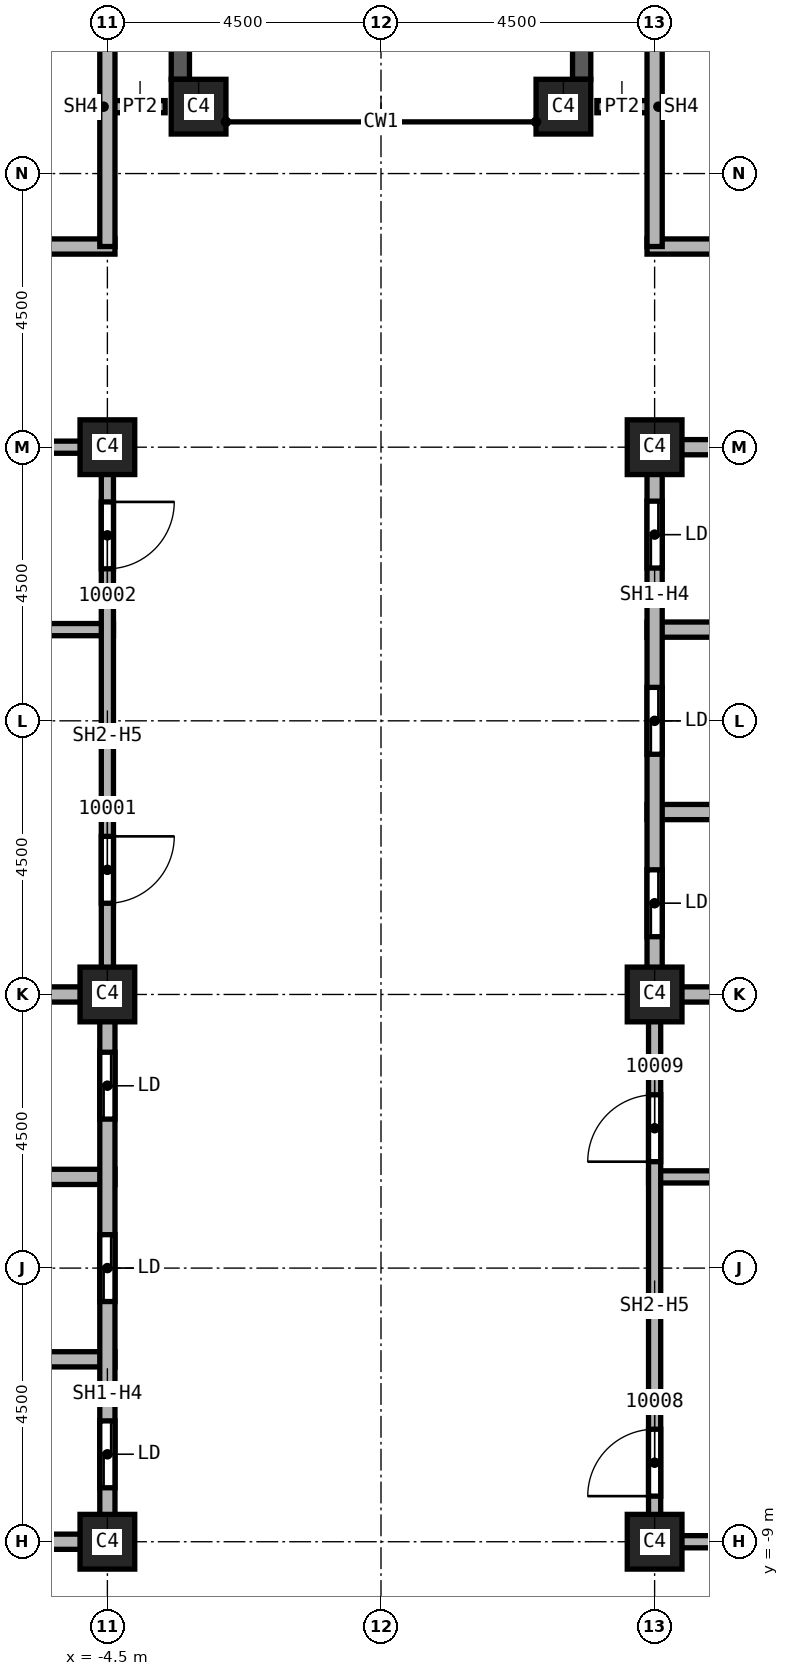
"""IFC4 building model, lengths in metres.
Left out: names, types, materials, properties, quantities, classifications, styles, units other than length and angle.
Written with IfcOpenShell. Run it as: python <this file> out.ifc"""

import sys

from ifc_helpers import new_model, si_unit, direction, frame, frame_2d, origin, origin_2d, place, context, subcontext, project, spatial, rectangle, extrude, element, fill, save


model = new_model("IFC4")
c1 = context("Model", 3, precision=1e-05, world=origin(), true_north=direction((0.0, 1.0)))
c2 = subcontext(c1, "Body", "Model", "MODEL_VIEW")
j1 = project(units=[si_unit("LENGTHUNIT", "METRE"), si_unit("PLANEANGLEUNIT", "RADIAN")], contexts=[c1])
p1 = place(None, origin())
s1 = spatial("IfcSite", under=j1, at=p1, CompositionType="ELEMENT")
p2 = place(p1, origin())
s2 = spatial("IfcBuilding", under=s1, at=p2, CompositionType="ELEMENT")
p3 = place(p2, frame((0.0, 0.0, 170.0)))
s3 = spatial("IfcBuildingStorey", under=s2, at=p3, CompositionType="ELEMENT", Elevation=170.0)
for number, where, z_axis, x_axis in (
    (1, (4.5, 0.0, 0.0), (0.0, 0.0, 1.0), (1.0, 0.0, 0.0)),
    (2, (4.5, 9.0, 0.0), (0.0, 0.0, 1.0), (1.0, 0.0, 0.0)),
    (3, (4.5, -9.0, 0.0), (0.0, 0.0, 1.0), (1.0, 0.0, 0.0)),
    (4, (-4.5, 0.0, 0.0), (0.0, 0.0, 1.0), (1.0, 0.0, 0.0)),
    (5, (-4.5, 9.0, 0.0), (0.0, 0.0, 1.0), (1.0, 0.0, 0.0)),
    (6, (-4.5, -9.0, 0.0), (0.0, 0.0, 1.0), (1.0, 0.0, 0.0)),
    (7, (3.0, 14.6, 0.0), (0.0, 0.0, 1.0), (1.0, 0.0, 0.0)),
    (8, (-3.0, 14.6, 0.0), (0.0, 0.0, 1.0), (1.0, 0.0, 0.0)),
):
    element("IfcColumn", number, at=place(p3, frame(where, z_axis=z_axis, x_axis=x_axis)), inside=s3, PredefinedType="COLUMN", context=c2, shape_type="SweptSolid", body=[
        extrude(rectangle(XDim=0.9, YDim=0.9, at=origin_2d()), origin(), (0.0, 0.0, 1.0), 3.7),
    ])
p4 = place(p3, frame((3.3, 23.05, 0.0), z_axis=(0.0, 0.0, 1.0), x_axis=(0.0, -1.0, 0.0)))
e9 = element("IfcWall", 9, at=p4, inside=s3, PredefinedType="SOLIDWALL", context=c2, shape_type="SweptSolid", body=[
    extrude(rectangle(XDim=8.0, YDim=0.3, at=frame_2d((4.0, 0.0))), origin(), (0.0, 0.0, 1.0), 3.1),
])
p5 = place(p4, frame((0.8, 0.0, 0.8)))
e10 = element("IfcOpeningElement", 10, at=p5, cuts=e9, PredefinedType="OPENING", context=c2, shape_type="SweptSolid", body=[
    extrude(rectangle(XDim=2.4, YDim=1.95, at=frame_2d((1.2, 0.975))), frame((0.0, 0.15, 0.0), z_axis=(0.0, -1.0, 0.0), x_axis=(1.0, 0.0, 0.0)), (0.0, 0.0, 1.0), 0.3),
])
p6 = place(p4, frame((4.8, 0.0, 0.8)))
e11 = element("IfcOpeningElement", 11, at=p6, cuts=e9, PredefinedType="OPENING", context=c2, shape_type="SweptSolid", body=[
    extrude(rectangle(XDim=2.4, YDim=1.95, at=frame_2d((1.2, 0.975))), frame((0.0, 0.15, 0.0), z_axis=(0.0, -1.0, 0.0), x_axis=(1.0, 0.0, 0.0)), (0.0, 0.0, 1.0), 0.3),
])
p7 = place(p3, frame((-3.3, 15.05, 0.0), z_axis=(0.0, 0.0, 1.0), x_axis=(0.0, 1.0, 0.0)))
e12 = element("IfcWall", 12, at=p7, inside=s3, PredefinedType="SOLIDWALL", context=c2, shape_type="SweptSolid", body=[
    extrude(rectangle(XDim=8.0, YDim=0.3, at=frame_2d((4.0, 0.0))), origin(), (0.0, 0.0, 1.0), 3.1),
])
p8 = place(p7, frame((0.8, 0.0, 0.8)))
e13 = element("IfcOpeningElement", 13, at=p8, cuts=e12, PredefinedType="OPENING", context=c2, shape_type="SweptSolid", body=[
    extrude(rectangle(XDim=2.4, YDim=1.95, at=frame_2d((1.2, 0.975))), frame((0.0, 0.15, 0.0), z_axis=(0.0, -1.0, 0.0), x_axis=(1.0, 0.0, 0.0)), (0.0, 0.0, 1.0), 0.3),
])
p9 = place(p7, frame((4.8, 0.0, 0.8)))
e14 = element("IfcOpeningElement", 14, at=p9, cuts=e12, PredefinedType="OPENING", context=c2, shape_type="SweptSolid", body=[
    extrude(rectangle(XDim=2.4, YDim=1.95, at=frame_2d((1.2, 0.975))), frame((0.0, 0.15, 0.0), z_axis=(0.0, -1.0, 0.0), x_axis=(1.0, 0.0, 0.0)), (0.0, 0.0, 1.0), 0.3),
])
for number, where, z_axis, x_axis in (
    (15, (-4.5, 14.6, 0.0), (0.0, 0.0, 1.0), (1.0, 0.0, 0.0)),
    (16, (3.55, 14.6, 0.0), (0.0, 0.0, 1.0), (1.0, 0.0, 0.0)),
):
    element("IfcWall", number, at=place(p3, frame(where, z_axis=z_axis, x_axis=x_axis)), inside=s3, PredefinedType="PARTITIONING", context=c2, shape_type="SweptSolid", body=[
        extrude(rectangle(XDim=0.95, YDim=0.2, at=frame_2d((0.475, 0.0))), origin(), (0.0, 0.0, 1.0), 3.7),
    ])
p10 = place(p3, frame((-7.6, 6.0, 0.0), z_axis=(0.0, 0.0, 1.0), x_axis=(1.0, 0.0, 0.0)))
e17 = element("IfcWall", 17, at=p10, inside=s3, PredefinedType="SOLIDWALL", context=c2, shape_type="SweptSolid", body=[
    extrude(rectangle(XDim=3.2, YDim=0.2, at=frame_2d((1.6, 0.0))), origin(), (0.0, 0.0, 1.0), 3.7),
])
p11 = place(p3, frame((-7.5, 9.0, 0.0), z_axis=(0.0, 0.0, 1.0), x_axis=(1.0, 0.0, 0.0)))
e18 = element("IfcWall", 18, at=p11, inside=s3, PredefinedType="SOLIDWALL", context=c2, shape_type="SweptSolid", body=[
    extrude(rectangle(XDim=3.0, YDim=0.2, at=frame_2d((1.5, 0.0))), origin(), (0.0, 0.0, 1.0), 2.938),
])
p12 = place(p3, frame((-4.5, 9.1, 0.0), z_axis=(0.0, 0.0, 1.0), x_axis=(0.0, -1.0, 0.0)))
e19 = element("IfcWall", 19, at=p12, inside=s3, PredefinedType="SOLIDWALL", context=c2, shape_type="SweptSolid", body=[
    extrude(rectangle(XDim=9.1, YDim=0.2, at=frame_2d((4.55, 0.0))), origin(), (0.0, 0.0, 1.0), 2.938),
])
p13 = place(p12, frame((6.5, 0.0, 0.0)))
e20 = element("IfcOpeningElement", 20, at=p13, cuts=e19, PredefinedType="OPENING", context=c2, shape_type="SweptSolid", body=[
    extrude(rectangle(XDim=1.1, YDim=2.1, at=frame_2d((0.55, 1.05))), frame((0.0, 0.1, 0.0), z_axis=(0.0, -1.0, 0.0), x_axis=(1.0, 0.0, 0.0)), (0.0, 0.0, 1.0), 0.2),
])
p14 = place(p12, frame((1.0, 0.0, 0.0)))
e21 = element("IfcOpeningElement", 21, at=p14, cuts=e19, PredefinedType="OPENING", context=c2, shape_type="SweptSolid", body=[
    extrude(rectangle(XDim=1.1, YDim=2.1, at=frame_2d((0.55, 1.05))), frame((0.0, 0.1, 0.0), z_axis=(0.0, -1.0, 0.0), x_axis=(1.0, 0.0, 0.0)), (0.0, 0.0, 1.0), 0.2),
])
p15 = place(p3, frame((4.4, -3.0, 0.0), z_axis=(0.0, 0.0, 1.0), x_axis=(1.0, 0.0, 0.0)))
e22 = element("IfcWall", 22, at=p15, inside=s3, PredefinedType="SOLIDWALL", context=c2, shape_type="SweptSolid", body=[
    extrude(rectangle(XDim=3.225, YDim=0.2, at=frame_2d((1.613, 0.0))), origin(), (0.0, 0.0, 1.0), 3.7),
])
p16 = place(p3, frame((4.5, -9.1, 0.0), z_axis=(0.0, 0.0, 1.0), x_axis=(0.0, 1.0, 0.0)))
e23 = element("IfcWall", 23, at=p16, inside=s3, PredefinedType="SOLIDWALL", context=c2, shape_type="SweptSolid", body=[
    extrude(rectangle(XDim=9.1, YDim=0.2, at=frame_2d((4.55, 0.0))), origin(), (0.0, 0.0, 1.0), 2.938),
])
p17 = place(p16, frame((0.85, 0.0, 0.0)))
e24 = element("IfcOpeningElement", 24, at=p17, cuts=e23, PredefinedType="OPENING", context=c2, shape_type="SweptSolid", body=[
    extrude(rectangle(XDim=1.1, YDim=2.1, at=frame_2d((0.55, 1.05))), frame((0.0, 0.1, 0.0), z_axis=(0.0, -1.0, 0.0), x_axis=(1.0, 0.0, 0.0)), (0.0, 0.0, 1.0), 0.2),
])
p18 = place(p16, frame((6.35, 0.0, 0.0)))
e25 = element("IfcOpeningElement", 25, at=p18, cuts=e23, PredefinedType="OPENING", context=c2, shape_type="SweptSolid", body=[
    extrude(rectangle(XDim=1.1, YDim=2.1, at=frame_2d((0.55, 1.05))), frame((0.0, 0.1, 0.0), z_axis=(0.0, -1.0, 0.0), x_axis=(1.0, 0.0, 0.0)), (0.0, 0.0, 1.0), 0.2),
])
p19 = place(p3, frame((7.5, -9.0, 0.0), z_axis=(0.0, 0.0, 1.0), x_axis=(-1.0, 0.0, 0.0)))
e26 = element("IfcWall", 26, at=p19, inside=s3, PredefinedType="SOLIDWALL", context=c2, shape_type="SweptSolid", body=[
    extrude(rectangle(XDim=3.0, YDim=0.2, at=frame_2d((1.5, 0.0))), origin(), (0.0, 0.0, 1.0), 2.938),
])
p20 = place(p3, frame((-13.625, -3.0, 0.0), z_axis=(0.0, 0.0, 1.0), x_axis=(1.0, 0.0, 0.0)))
e27 = element("IfcWall", 27, at=p20, inside=s3, PredefinedType="SOLIDWALL", context=c2, shape_type="SweptSolid", body=[
    extrude(rectangle(XDim=9.25, YDim=0.25, at=frame_2d((4.625, 0.0))), origin(), (0.0, 0.0, 1.0), 3.7),
])
p21 = place(p20, frame((3.25, 0.0, 0.0)))
e28 = element("IfcOpeningElement", 28, at=p21, cuts=e27, PredefinedType="OPENING", context=c2, shape_type="SweptSolid", body=[
    extrude(rectangle(XDim=1.1, YDim=2.1, at=frame_2d((0.55, 1.05))), frame((0.0, 0.125, 0.0), z_axis=(0.0, -1.0, 0.0), x_axis=(1.0, 0.0, 0.0)), (0.0, 0.0, 1.0), 0.25),
])
for number, where, z_axis, x_axis in (
    (29, (-7.625, -6.0, 0.0), (0.0, 0.0, 1.0), (1.0, 0.0, 0.0)),
    (30, (-7.625, 0.0, 0.0), (0.0, 0.0, 1.0), (1.0, 0.0, 0.0)),
):
    element("IfcWall", number, at=place(p3, frame(where, z_axis=z_axis, x_axis=x_axis)), inside=s3, PredefinedType="SOLIDWALL", context=c2, shape_type="SweptSolid", body=[
        extrude(rectangle(XDim=3.25, YDim=0.25, at=frame_2d((1.625, 0.0))), origin(), (0.0, 0.0, 1.0), 3.7),
    ])
p22 = place(p3, frame((-4.5, -9.0, 0.0), z_axis=(0.0, 0.0, 1.0), x_axis=(-1.0, 0.0, 0.0)))
e31 = element("IfcWall", 31, at=p22, inside=s3, PredefinedType="SOLIDWALL", context=c2, shape_type="SweptSolid", body=[
    extrude(rectangle(XDim=3.0, YDim=0.25, at=frame_2d((1.5, 0.0))), origin(), (0.0, 0.0, 1.0), 2.938),
])
p23 = place(p3, frame((-4.5, 0.0, 0.0), z_axis=(0.0, 0.0, 1.0), x_axis=(0.0, -1.0, 0.0)))
e32 = element("IfcWall", 32, at=p23, inside=s3, PredefinedType="SOLIDWALL", context=c2, shape_type="SweptSolid", body=[
    extrude(rectangle(XDim=9.125, YDim=0.25, at=frame_2d((4.562, 0.0))), origin(), (0.0, 0.0, 1.0), 2.938),
])
p24 = place(p23, frame((7.012, 0.0, 0.0)))
e33 = element("IfcOpeningElement", 33, at=p24, cuts=e32, PredefinedType="OPENING", context=c2, shape_type="SweptSolid", body=[
    extrude(rectangle(XDim=1.1, YDim=2.1, at=frame_2d((0.55, 1.05))), frame((0.0, 0.125, 0.0), z_axis=(0.0, -1.0, 0.0), x_axis=(1.0, 0.0, 0.0)), (0.0, 0.0, 1.0), 0.25),
])
p25 = place(p23, frame((3.95, 0.0, 0.0)))
e34 = element("IfcOpeningElement", 34, at=p25, cuts=e32, PredefinedType="OPENING", context=c2, shape_type="SweptSolid", body=[
    extrude(rectangle(XDim=1.1, YDim=2.1, at=frame_2d((0.55, 1.05))), frame((0.0, 0.125, 0.0), z_axis=(0.0, -1.0, 0.0), x_axis=(1.0, 0.0, 0.0)), (0.0, 0.0, 1.0), 0.25),
])
p26 = place(p23, frame((0.95, 0.0, 0.0)))
e35 = element("IfcOpeningElement", 35, at=p26, cuts=e32, PredefinedType="OPENING", context=c2, shape_type="SweptSolid", body=[
    extrude(rectangle(XDim=1.1, YDim=2.1, at=frame_2d((0.55, 1.05))), frame((0.0, 0.125, 0.0), z_axis=(0.0, -1.0, 0.0), x_axis=(1.0, 0.0, 0.0)), (0.0, 0.0, 1.0), 0.25),
])
p27 = place(p3, frame((4.375, 0.0, 0.0), z_axis=(0.0, 0.0, 1.0), x_axis=(1.0, 0.0, 0.0)))
e36 = element("IfcWall", 36, at=p27, inside=s3, PredefinedType="SOLIDWALL", context=c2, shape_type="SweptSolid", body=[
    extrude(rectangle(XDim=3.25, YDim=0.25, at=frame_2d((1.625, 0.0))), origin(), (0.0, 0.0, 1.0), 3.7),
])
p28 = place(p3, frame((4.375, 3.0, 0.0), z_axis=(0.0, 0.0, 1.0), x_axis=(1.0, 0.0, 0.0)))
e37 = element("IfcWall", 37, at=p28, inside=s3, PredefinedType="SOLIDWALL", context=c2, shape_type="SweptSolid", body=[
    extrude(rectangle(XDim=9.25, YDim=0.25, at=frame_2d((4.625, 0.0))), origin(), (0.0, 0.0, 1.0), 3.7),
])
p29 = place(p28, frame((3.375, 0.0, 0.0)))
e38 = element("IfcOpeningElement", 38, at=p29, cuts=e37, PredefinedType="OPENING", context=c2, shape_type="SweptSolid", body=[
    extrude(rectangle(XDim=1.1, YDim=2.1, at=frame_2d((0.55, 1.05))), frame((0.0, 0.125, 0.0), z_axis=(0.0, -1.0, 0.0), x_axis=(1.0, 0.0, 0.0)), (0.0, 0.0, 1.0), 0.25),
])
p30 = place(p3, frame((4.375, 6.0, 0.0), z_axis=(0.0, 0.0, 1.0), x_axis=(1.0, 0.0, 0.0)))
e39 = element("IfcWall", 39, at=p30, inside=s3, PredefinedType="SOLIDWALL", context=c2, shape_type="SweptSolid", body=[
    extrude(rectangle(XDim=3.25, YDim=0.25, at=frame_2d((1.625, 0.0))), origin(), (0.0, 0.0, 1.0), 3.7),
])
p31 = place(p3, frame((4.5, 0.0, 0.0), z_axis=(0.0, 0.0, 1.0), x_axis=(0.0, 1.0, 0.0)))
e40 = element("IfcWall", 40, at=p31, inside=s3, PredefinedType="SOLIDWALL", context=c2, shape_type="SweptSolid", body=[
    extrude(rectangle(XDim=9.125, YDim=0.25, at=frame_2d((4.562, 0.0))), origin(), (0.0, 0.0, 1.0), 2.938),
])
p32 = place(p31, frame((0.95, 0.0, 0.0)))
e41 = element("IfcOpeningElement", 41, at=p32, cuts=e40, PredefinedType="OPENING", context=c2, shape_type="SweptSolid", body=[
    extrude(rectangle(XDim=1.1, YDim=2.1, at=frame_2d((0.55, 1.05))), frame((0.0, 0.125, 0.0), z_axis=(0.0, -1.0, 0.0), x_axis=(1.0, 0.0, 0.0)), (0.0, 0.0, 1.0), 0.25),
])
p33 = place(p31, frame((3.95, 0.0, 0.0)))
e42 = element("IfcOpeningElement", 42, at=p33, cuts=e40, PredefinedType="OPENING", context=c2, shape_type="SweptSolid", body=[
    extrude(rectangle(XDim=1.1, YDim=2.1, at=frame_2d((0.55, 1.05))), frame((0.0, 0.125, 0.0), z_axis=(0.0, -1.0, 0.0), x_axis=(1.0, 0.0, 0.0)), (0.0, 0.0, 1.0), 0.25),
])
p34 = place(p31, frame((7.012, 0.0, 0.0)))
e43 = element("IfcOpeningElement", 43, at=p34, cuts=e40, PredefinedType="OPENING", context=c2, shape_type="SweptSolid", body=[
    extrude(rectangle(XDim=1.1, YDim=2.1, at=frame_2d((0.55, 1.05))), frame((0.0, 0.125, 0.0), z_axis=(0.0, -1.0, 0.0), x_axis=(1.0, 0.0, 0.0)), (0.0, 0.0, 1.0), 0.25),
])
p35 = place(p3, frame((4.5, 9.0, 0.0), z_axis=(0.0, 0.0, 1.0), x_axis=(1.0, 0.0, 0.0)))
e44 = element("IfcWall", 44, at=p35, inside=s3, PredefinedType="SOLIDWALL", context=c2, shape_type="SweptSolid", body=[
    extrude(rectangle(XDim=3.0, YDim=0.25, at=frame_2d((1.5, 0.0))), origin(), (0.0, 0.0, 1.0), 2.938),
])
p36 = place(p3, frame((-13.5, 12.3, 0.0), z_axis=(0.0, 0.0, 1.0), x_axis=(1.0, 0.0, 0.0)))
e45 = element("IfcWall", 45, at=p36, inside=s3, PredefinedType="SOLIDWALL", context=c2, shape_type="SweptSolid", body=[
    extrude(rectangle(XDim=9.125, YDim=0.25, at=frame_2d((4.562, 0.0))), origin(), (0.0, 0.0, 1.0), 3.7),
])
p37 = place(p36, frame((0.6, 0.0, 0.0)))
e46 = element("IfcOpeningElement", 46, at=p37, cuts=e45, PredefinedType="OPENING", context=c2, shape_type="SweptSolid", body=[
    extrude(rectangle(XDim=1.2, YDim=2.1, at=frame_2d((0.6, 1.05))), frame((0.0, 0.125, 0.0), z_axis=(0.0, -1.0, 0.0), x_axis=(1.0, 0.0, 0.0)), (0.0, 0.0, 1.0), 0.25),
])
p38 = place(p3, frame((-4.5, 16.8, 0.0), z_axis=(0.0, 0.0, 1.0), x_axis=(0.0, -1.0, 0.0)))
e47 = element("IfcWall", 47, at=p38, inside=s3, PredefinedType="SOLIDWALL", context=c2, shape_type="SweptSolid", body=[
    extrude(rectangle(XDim=4.5, YDim=0.25, at=frame_2d((2.25, 0.0))), origin(), (0.0, 0.0, 1.0), 3.7),
])
p39 = place(p3, frame((4.375, 12.3, 0.0), z_axis=(0.0, 0.0, 1.0), x_axis=(1.0, 0.0, 0.0)))
e48 = element("IfcWall", 48, at=p39, inside=s3, PredefinedType="SOLIDWALL", context=c2, shape_type="SweptSolid", body=[
    extrude(rectangle(XDim=9.125, YDim=0.25, at=frame_2d((4.562, 0.0))), origin(), (0.0, 0.0, 1.0), 3.7),
])
p40 = place(p39, frame((7.2, 0.0, 0.0)))
e49 = element("IfcOpeningElement", 49, at=p40, cuts=e48, PredefinedType="OPENING", context=c2, shape_type="SweptSolid", body=[
    extrude(rectangle(XDim=1.2, YDim=2.1, at=frame_2d((0.6, 1.05))), frame((0.0, 0.125, 0.0), z_axis=(0.0, -1.0, 0.0), x_axis=(1.0, 0.0, 0.0)), (0.0, 0.0, 1.0), 0.25),
])
p41 = place(p3, frame((4.5, 12.3, 0.0), z_axis=(0.0, 0.0, 1.0), x_axis=(0.0, 1.0, 0.0)))
e50 = element("IfcWall", 50, at=p41, inside=s3, PredefinedType="SOLIDWALL", context=c2, shape_type="SweptSolid", body=[
    extrude(rectangle(XDim=4.5, YDim=0.25, at=frame_2d((2.25, 0.0))), origin(), (0.0, 0.0, 1.0), 3.7),
])
p42 = place(p13, origin())
e51 = element("IfcDoor", 51, at=p42, inside=s3, OperationType="SINGLE_SWING_RIGHT", PredefinedType="DOOR", context=c2, shape_type="SweptSolid", body=[
    extrude(rectangle(XDim=1.1, YDim=2.1, at=frame_2d((0.55, 1.05))), frame((0.0, 0.025, 0.0), z_axis=(0.0, -1.0, 0.0), x_axis=(1.0, 0.0, 0.0)), (0.0, 0.0, 1.0), 0.05),
])
fill(e20, e51)
p43 = place(p14, origin())
e52 = element("IfcDoor", 52, at=p43, inside=s3, OperationType="SINGLE_SWING_LEFT", PredefinedType="DOOR", context=c2, shape_type="SweptSolid", body=[
    extrude(rectangle(XDim=1.1, YDim=2.1, at=frame_2d((0.55, 1.05))), frame((0.0, 0.025, 0.0), z_axis=(0.0, -1.0, 0.0), x_axis=(1.0, 0.0, 0.0)), (0.0, 0.0, 1.0), 0.05),
])
fill(e21, e52)
p44 = place(p17, origin())
e53 = element("IfcDoor", 53, at=p44, inside=s3, OperationType="SINGLE_SWING_LEFT", PredefinedType="DOOR", context=c2, shape_type="SweptSolid", body=[
    extrude(rectangle(XDim=1.1, YDim=2.1, at=frame_2d((0.55, 1.05))), frame((0.0, 0.025, 0.0), z_axis=(0.0, -1.0, 0.0), x_axis=(1.0, 0.0, 0.0)), (0.0, 0.0, 1.0), 0.05),
])
fill(e24, e53)
p45 = place(p18, origin())
e54 = element("IfcDoor", 54, at=p45, inside=s3, OperationType="SINGLE_SWING_RIGHT", PredefinedType="DOOR", context=c2, shape_type="SweptSolid", body=[
    extrude(rectangle(XDim=1.1, YDim=2.1, at=frame_2d((0.55, 1.05))), frame((0.0, 0.025, 0.0), z_axis=(0.0, -1.0, 0.0), x_axis=(1.0, 0.0, 0.0)), (0.0, 0.0, 1.0), 0.05),
])
fill(e25, e54)
p46 = place(p24, origin())
e55 = element("IfcDoor", 55, at=p46, inside=s3, OperationType="SLIDING_TO_LEFT", PredefinedType="DOOR", context=c2, shape_type="SweptSolid", body=[
    extrude(rectangle(XDim=1.1, YDim=2.1, at=frame_2d((0.55, 1.05))), frame((0.0, 0.025, 0.0), z_axis=(0.0, -1.0, 0.0), x_axis=(1.0, 0.0, 0.0)), (0.0, 0.0, 1.0), 0.05),
])
fill(e33, e55)
p47 = place(p25, origin())
e56 = element("IfcDoor", 56, at=p47, inside=s3, OperationType="SLIDING_TO_LEFT", PredefinedType="DOOR", context=c2, shape_type="SweptSolid", body=[
    extrude(rectangle(XDim=1.1, YDim=2.1, at=frame_2d((0.55, 1.05))), frame((0.0, 0.025, 0.0), z_axis=(0.0, -1.0, 0.0), x_axis=(1.0, 0.0, 0.0)), (0.0, 0.0, 1.0), 0.05),
])
fill(e34, e56)
p48 = place(p26, origin())
e57 = element("IfcDoor", 57, at=p48, inside=s3, OperationType="SLIDING_TO_LEFT", PredefinedType="DOOR", context=c2, shape_type="SweptSolid", body=[
    extrude(rectangle(XDim=1.1, YDim=2.1, at=frame_2d((0.55, 1.05))), frame((0.0, 0.025, 0.0), z_axis=(0.0, -1.0, 0.0), x_axis=(1.0, 0.0, 0.0)), (0.0, 0.0, 1.0), 0.05),
])
fill(e35, e57)
p49 = place(p32, origin())
e58 = element("IfcDoor", 58, at=p49, inside=s3, OperationType="SLIDING_TO_LEFT", PredefinedType="DOOR", context=c2, shape_type="SweptSolid", body=[
    extrude(rectangle(XDim=1.1, YDim=2.1, at=frame_2d((0.55, 1.05))), frame((0.0, 0.025, 0.0), z_axis=(0.0, -1.0, 0.0), x_axis=(1.0, 0.0, 0.0)), (0.0, 0.0, 1.0), 0.05),
])
fill(e41, e58)
p50 = place(p33, origin())
e59 = element("IfcDoor", 59, at=p50, inside=s3, OperationType="SLIDING_TO_LEFT", PredefinedType="DOOR", context=c2, shape_type="SweptSolid", body=[
    extrude(rectangle(XDim=1.1, YDim=2.1, at=frame_2d((0.55, 1.05))), frame((0.0, 0.025, 0.0), z_axis=(0.0, -1.0, 0.0), x_axis=(1.0, 0.0, 0.0)), (0.0, 0.0, 1.0), 0.05),
])
fill(e42, e59)
p51 = place(p34, origin())
e60 = element("IfcDoor", 60, at=p51, inside=s3, OperationType="SLIDING_TO_LEFT", PredefinedType="DOOR", context=c2, shape_type="SweptSolid", body=[
    extrude(rectangle(XDim=1.1, YDim=2.1, at=frame_2d((0.55, 1.05))), frame((0.0, 0.025, 0.0), z_axis=(0.0, -1.0, 0.0), x_axis=(1.0, 0.0, 0.0)), (0.0, 0.0, 1.0), 0.05),
])
fill(e43, e60)
save(model, sys.argv[1])
